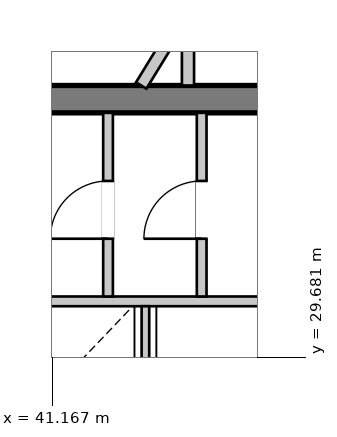
"""IFC4 building model, lengths in metres.
Left out: names, types, materials, properties, quantities, classifications, styles, units other than length and angle.
Written with IfcOpenShell. Run it as: python <this file> out.ifc"""

import sys

from ifc_helpers import new_model, si_unit, direction, frame, frame_2d, origin, place, context, subcontext, project, spatial, rectangle, extrude, source, transform, mapped, element, fill, save


model = new_model("IFC4")
c1 = context("Model", 3, precision=1e-05, world=origin(), true_north=direction((0.0, 1.0)))
c2 = subcontext(c1, "Body", "Model", "MODEL_VIEW")
j1 = project(units=[si_unit("LENGTHUNIT", "METRE"), si_unit("PLANEANGLEUNIT", "RADIAN")], contexts=[c1])
p1 = place(None, origin())
s1 = spatial("IfcSite", under=j1, at=p1, CompositionType="ELEMENT")
p2 = place(p1, origin())
s2 = spatial("IfcBuilding", under=s1, at=p2, CompositionType="ELEMENT")
p3 = place(p2, frame((0.0, 0.0, 209.6)))
s3 = spatial("IfcBuildingStorey", under=s2, at=p3, CompositionType="ELEMENT", Elevation=209.6)
p4 = place(p3, frame((29.65, 33.925, 0.0), z_axis=(0.0, 0.0, 1.0), x_axis=(1.0, 0.0, 0.0)))
e1 = element("IfcWall", 1, at=p4, inside=s3, PredefinedType="SHEAR", context=c2, shape_type="SweptSolid", body=[
    extrude(rectangle(XDim=16.7, YDim=0.45, at=frame_2d((8.35, 0.0))), origin(), (0.0, 0.0, 1.0), 3.33),
])
p5 = place(p4, frame((1.45, 0.0, 0.0)))
e2 = element("IfcOpeningElement", 2, at=p5, cuts=e1, PredefinedType="OPENING", context=c2, shape_type="SweptSolid", body=[
    extrude(rectangle(XDim=0.95, YDim=2.1, at=frame_2d((0.475, 1.05))), frame((0.0, 0.235, 0.0), z_axis=(0.0, -1.0, 0.0), x_axis=(1.0, 0.0, 0.0)), (0.0, 0.0, 1.0), 0.47),
])
p6 = place(p4, frame((3.83, 0.0, 0.0)))
e3 = element("IfcOpeningElement", 3, at=p6, cuts=e1, PredefinedType="OPENING", context=c2, shape_type="SweptSolid", body=[
    extrude(rectangle(XDim=1.32, YDim=2.2, at=frame_2d((0.66, 1.1))), frame((0.0, 0.235, 0.0), z_axis=(0.0, -1.0, 0.0), x_axis=(1.0, 0.0, 0.0)), (0.0, 0.0, 1.0), 0.47),
])
p7 = place(p3, frame((40.72, 30.6, 0.0), z_axis=(0.0, 0.0, 1.0), x_axis=(1.0, 0.0, 0.0)))
e4 = element("IfcWall", 4, at=p7, inside=s3, PredefinedType="PARTITIONING", context=c2, shape_type="SweptSolid", body=[
    extrude(rectangle(XDim=5.18, YDim=0.16, at=frame_2d((2.59, 0.0))), origin(), (0.0, 0.0, 1.0), 3.33),
])
p8 = place(p3, frame((42.7, 28.6, 0.0), z_axis=(0.0, 0.0, 1.0), x_axis=(0.0, 1.0, 0.0)))
e5 = element("IfcWall", 5, at=p8, inside=s3, PredefinedType="PARTITIONING", context=c2, shape_type="SweptSolid", body=[
    extrude(rectangle(XDim=1.92, YDim=0.125, at=frame_2d((0.96, 0.0))), origin(), (0.0, 0.0, 1.0), 3.33),
])
p9 = place(p3, frame((42.085, 30.68, 0.0), z_axis=(0.0, 0.0, 1.0), x_axis=(0.0, 1.0, 0.0)))
e6 = element("IfcWall", 6, at=p9, inside=s3, PredefinedType="PARTITIONING", context=c2, shape_type="SweptSolid", body=[
    extrude(rectangle(XDim=3.02, YDim=0.16, at=frame_2d((1.51, 0.0))), origin(), (0.0, 0.0, 1.0), 3.33),
])
p10 = place(p9, frame((0.95, 0.0, 0.0)))
e7 = element("IfcOpeningElement", 7, at=p10, cuts=e6, PredefinedType="OPENING", context=c2, shape_type="SweptSolid", body=[
    extrude(rectangle(XDim=0.95, YDim=2.1, at=frame_2d((0.475, 1.05))), frame((0.0, 0.09, 0.0), z_axis=(0.0, -1.0, 0.0), x_axis=(1.0, 0.0, 0.0)), (0.0, 0.0, 1.0), 0.18),
])
p11 = place(p3, frame((43.625, 30.68, 0.0), z_axis=(0.0, 0.0, 1.0), x_axis=(0.0, 1.0, 0.0)))
e8 = element("IfcWall", 8, at=p11, inside=s3, PredefinedType="PARTITIONING", context=c2, shape_type="SweptSolid", body=[
    extrude(rectangle(XDim=3.02, YDim=0.16, at=frame_2d((1.51, 0.0))), origin(), (0.0, 0.0, 1.0), 3.33),
])
p12 = place(p11, frame((0.95, 0.0, 0.0)))
e9 = element("IfcOpeningElement", 9, at=p12, cuts=e8, PredefinedType="OPENING", context=c2, shape_type="SweptSolid", body=[
    extrude(rectangle(XDim=0.95, YDim=2.1, at=frame_2d((0.475, 1.05))), frame((0.0, 0.09, 0.0), z_axis=(0.0, -1.0, 0.0), x_axis=(1.0, 0.0, 0.0)), (0.0, 0.0, 1.0), 0.18),
])
p13 = place(p3, frame((42.631, 34.15, 0.0), z_axis=(0.0, 0.0, 1.0), x_axis=(0.522717649011, 0.852505870603, 0.0)))
e10 = element("IfcWall", 10, at=p13, inside=s3, PredefinedType="PARTITIONING", context=c2, shape_type="SweptSolid", body=[
    extrude(rectangle(XDim=1.472, YDim=0.2, at=frame_2d((0.736, 0.0))), origin(), (0.0, 0.0, 1.0), 3.33),
])
p14 = place(p3, frame((43.4, 34.15, 0.0), z_axis=(0.0, 0.0, 1.0), x_axis=(0.0, 1.0, 0.0)))
e11 = element("IfcWall", 11, at=p14, inside=s3, PredefinedType="PARTITIONING", context=c2, shape_type="SweptSolid", body=[
    extrude(rectangle(XDim=1.85, YDim=0.2, at=frame_2d((0.925, 0.0))), origin(), (0.0, 0.0, 1.0), 3.33),
])
m1 = source(origin(), c2, "Body", "SweptSolid", [
    extrude(rectangle(XDim=0.95, YDim=2.1, at=frame_2d((0.475, 1.05))), frame((0.0, 0.025, 0.0), z_axis=(0.0, -1.0, 0.0), x_axis=(1.0, 0.0, 0.0)), (0.0, 0.0, 1.0), 0.05),
])
p15 = place(p10, origin())
e12 = element("IfcDoor", 12, at=p15, inside=s3, OperationType="SINGLE_SWING_LEFT", PredefinedType="DOOR", context=c2, shape_type="MappedRepresentation", body=[
    mapped(m1, transform((0.0, 0.0, 0.0), x_axis=(1.0, 0.0, 0.0), y_axis=(0.0, 1.0, 0.0), z_axis=(0.0, 0.0, 1.0), scale=1.0)),
])
fill(e7, e12)
p16 = place(p12, origin())
e13 = element("IfcDoor", 13, at=p16, inside=s3, OperationType="SINGLE_SWING_LEFT", PredefinedType="DOOR", context=c2, shape_type="MappedRepresentation", body=[
    mapped(m1, transform((0.0, 0.0, 0.0), x_axis=(1.0, 0.0, 0.0), y_axis=(0.0, 1.0, 0.0), z_axis=(0.0, 0.0, 1.0), scale=1.0)),
])
fill(e9, e13)
save(model, sys.argv[1])
